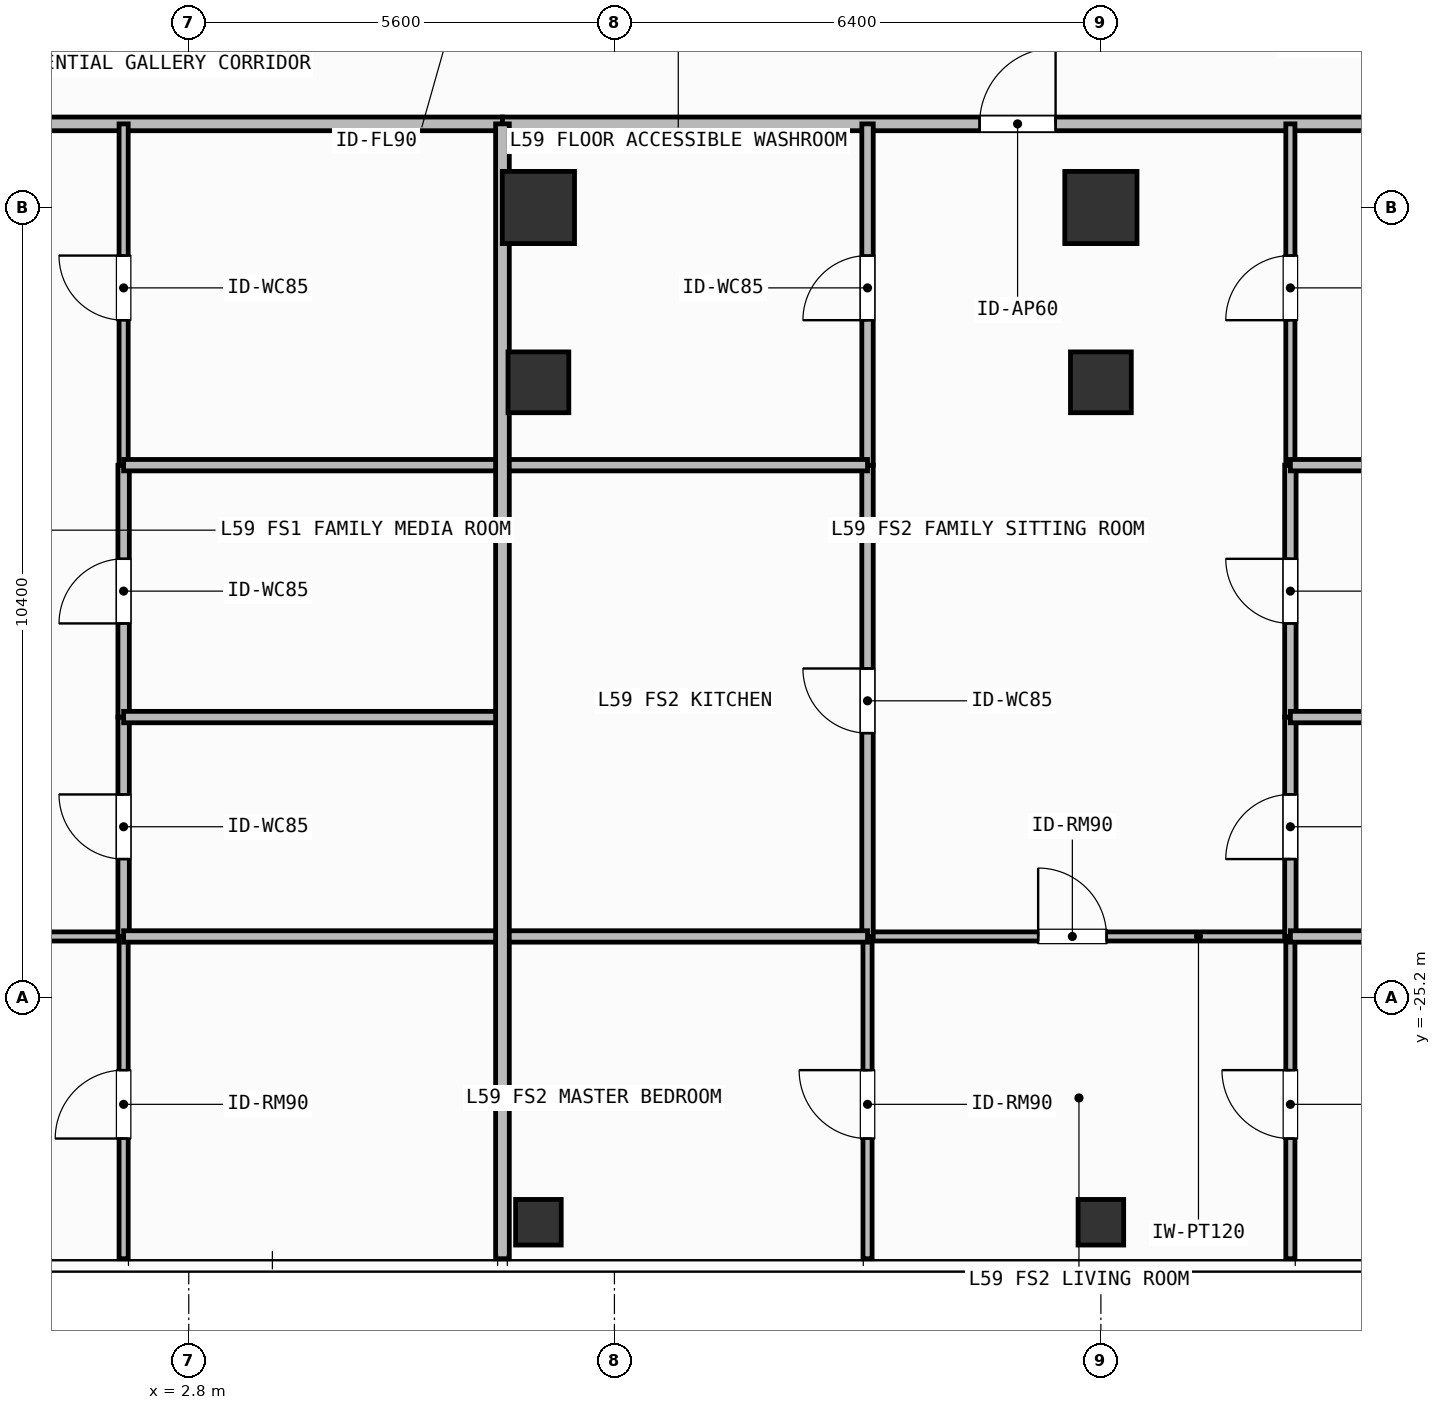
"""IFC4 building model, lengths in metres.
Left out: names, types, materials, properties, quantities, classifications, styles, units other than length and angle.
Written with IfcOpenShell. Run it as: python <this file> out.ifc"""

import sys

from ifc_helpers import new_model, si_unit, direction, frame, frame_2d, origin, origin_2d, place, context, subcontext, project, spatial, rectangle, hollow_rectangle, extrude, element, fill, save


model = new_model("IFC4")
c1 = context("Model", 3, precision=1e-05, world=origin(), true_north=direction((0.0, 1.0)))
c2 = subcontext(c1, "Body", "Model", "MODEL_VIEW")
j1 = project(units=[si_unit("LENGTHUNIT", "METRE"), si_unit("PLANEANGLEUNIT", "RADIAN")], contexts=[c1])
p1 = place(None, origin())
s1 = spatial("IfcSite", under=j1, at=p1, CompositionType="ELEMENT")
p2 = place(p1, origin())
s2 = spatial("IfcBuilding", under=s1, at=p2, CompositionType="ELEMENT")
p3 = place(p2, frame((0.0, 0.0, 243.0)))
s3 = spatial("IfcBuildingStorey", under=s2, at=p3, CompositionType="ELEMENT", Elevation=243.0)
for number, where, z_axis, x_axis in (
    (1, (7.4, -14.8, 0.0), (0.0, 0.0, 1.0), (1.0, 0.0, 0.0)),
    (2, (14.8, -14.8, 0.0), (0.0, 0.0, 1.0), (1.0, 0.0, 0.0)),
):
    element("IfcColumn", number, at=place(p3, frame(where, z_axis=z_axis, x_axis=x_axis)), inside=s3, PredefinedType="COLUMN", context=c2, shape_type="SweptSolid", body=[
        extrude(rectangle(XDim=0.95, YDim=0.95, at=origin_2d()), origin(), (0.0, 0.0, 1.0), 3.9),
    ])
for number, where, z_axis, x_axis in (
    (3, (7.4, -17.1, 0.0), (0.0, 0.0, 1.0), (1.0, 0.0, 0.0)),
    (4, (14.8, -17.1, 0.0), (0.0, 0.0, 1.0), (1.0, 0.0, 0.0)),
):
    element("IfcColumn", number, at=place(p3, frame(where, z_axis=z_axis, x_axis=x_axis)), inside=s3, PredefinedType="COLUMN", context=c2, shape_type="SweptSolid", body=[
        extrude(hollow_rectangle(XDim=0.8, YDim=0.8, WallThickness=0.036, at=origin_2d()), origin(), (0.0, 0.0, 1.0), 3.9),
    ])
for number, where, z_axis, x_axis in (
    (5, (7.4, -28.15, 0.0), (0.0, 0.0, 1.0), (1.0, 0.0, 0.0)),
    (6, (14.8, -28.15, 0.0), (0.0, 0.0, 1.0), (1.0, 0.0, 0.0)),
):
    element("IfcColumn", number, at=place(p3, frame(where, z_axis=z_axis, x_axis=x_axis)), inside=s3, PredefinedType="COLUMN", context=c2, shape_type="SweptSolid", body=[
        extrude(hollow_rectangle(XDim=0.6, YDim=0.6, WallThickness=0.028, at=origin_2d()), origin(), (0.0, 0.0, 1.0), 3.9),
    ])
p4 = place(p3, frame((-15.02, -13.7, 0.0), z_axis=(0.0, 0.0, 1.0), x_axis=(1.0, 0.0, 0.0)))
e7 = element("IfcWall", 7, at=p4, inside=s3, PredefinedType="PARTITIONING", context=c2, shape_type="SweptSolid", body=[
    extrude(rectangle(XDim=21.947, YDim=0.18, at=frame_2d((10.974, 0.0))), origin(), (0.0, 0.0, 1.0), 3.68),
])
p5 = place(p4, frame((10.205, 0.0, 0.0)))
e8 = element("IfcOpeningElement", 8, at=p5, cuts=e7, PredefinedType="OPENING", context=c2, shape_type="SweptSolid", body=[
    extrude(rectangle(XDim=1.0, YDim=2.2, at=frame_2d((0.5, 1.1))), frame((0.0, 0.1, 0.0), z_axis=(0.0, -1.0, 0.0), x_axis=(1.0, 0.0, 0.0)), (0.0, 0.0, 1.0), 0.2),
])
p6 = place(p3, frame((-3.691, -24.39, 0.0), z_axis=(0.0, 0.0, 1.0), x_axis=(1.0, 0.0, 0.0)))
e9 = element("IfcWall", 9, at=p6, inside=s3, PredefinedType="PARTITIONING", context=c2, shape_type="SweptSolid", body=[
    extrude(rectangle(XDim=5.634, YDim=0.12, at=frame_2d((2.817, 0.0))), origin(), (0.0, 0.0, 1.0), 3.68),
])
p7 = place(p6, frame((2.279, 0.0, 0.0)))
e10 = element("IfcOpeningElement", 10, at=p7, cuts=e9, PredefinedType="OPENING", context=c2, shape_type="SweptSolid", body=[
    extrude(rectangle(XDim=0.9, YDim=2.1, at=frame_2d((0.45, 1.05))), frame((0.0, 0.07, 0.0), z_axis=(0.0, -1.0, 0.0), x_axis=(1.0, 0.0, 0.0)), (0.0, 0.0, 1.0), 0.14),
])
p8 = place(p3, frame((1.943, -24.39, 0.0), z_axis=(0.0, 0.0, 1.0), x_axis=(0.0, 1.0, 0.0)))
e11 = element("IfcWall", 11, at=p8, inside=s3, PredefinedType="PARTITIONING", context=c2, shape_type="SweptSolid", body=[
    extrude(rectangle(XDim=2.886, YDim=0.15, at=frame_2d((1.443, 0.0))), origin(), (0.0, 0.0, 1.0), 3.68),
])
p9 = place(p8, frame((1.018, 0.0, 0.0)))
e12 = element("IfcOpeningElement", 12, at=p9, cuts=e11, PredefinedType="OPENING", context=c2, shape_type="SweptSolid", body=[
    extrude(rectangle(XDim=0.85, YDim=2.1, at=frame_2d((0.425, 1.05))), frame((0.0, 0.085, 0.0), z_axis=(0.0, -1.0, 0.0), x_axis=(1.0, 0.0, 0.0)), (0.0, 0.0, 1.0), 0.17),
])
p10 = place(p3, frame((1.943, -21.504, 0.0), z_axis=(0.0, 0.0, 1.0), x_axis=(0.0, 1.0, 0.0)))
e13 = element("IfcWall", 13, at=p10, inside=s3, PredefinedType="PARTITIONING", context=c2, shape_type="SweptSolid", body=[
    extrude(rectangle(XDim=3.314, YDim=0.15, at=frame_2d((1.657, 0.0))), origin(), (0.0, 0.0, 1.0), 3.68),
])
p11 = place(p10, frame((1.232, 0.0, 0.0)))
e14 = element("IfcOpeningElement", 14, at=p11, cuts=e13, PredefinedType="OPENING", context=c2, shape_type="SweptSolid", body=[
    extrude(rectangle(XDim=0.85, YDim=2.1, at=frame_2d((0.425, 1.05))), frame((0.0, 0.085, 0.0), z_axis=(0.0, -1.0, 0.0), x_axis=(1.0, 0.0, 0.0)), (0.0, 0.0, 1.0), 0.17),
])
p12 = place(p3, frame((1.943, -18.19, 0.0), z_axis=(0.0, 0.0, 1.0), x_axis=(0.0, 1.0, 0.0)))
e15 = element("IfcWall", 15, at=p12, inside=s3, PredefinedType="PARTITIONING", context=c2, shape_type="SweptSolid", body=[
    extrude(rectangle(XDim=4.49, YDim=0.12, at=frame_2d((2.245, 0.0))), origin(), (0.0, 0.0, 1.0), 3.68),
])
p13 = place(p12, frame((1.907, 0.0, 0.0)))
e16 = element("IfcOpeningElement", 16, at=p13, cuts=e15, PredefinedType="OPENING", context=c2, shape_type="SweptSolid", body=[
    extrude(rectangle(XDim=0.85, YDim=2.1, at=frame_2d((0.425, 1.05))), frame((0.0, 0.07, 0.0), z_axis=(0.0, -1.0, 0.0), x_axis=(1.0, 0.0, 0.0)), (0.0, 0.0, 1.0), 0.14),
])
p14 = place(p3, frame((1.943, -28.63, 0.0), z_axis=(0.0, 0.0, 1.0), x_axis=(0.0, 1.0, 0.0)))
e17 = element("IfcWall", 17, at=p14, inside=s3, PredefinedType="PARTITIONING", context=c2, shape_type="SweptSolid", body=[
    extrude(rectangle(XDim=4.24, YDim=0.12, at=frame_2d((2.12, 0.0))), origin(), (0.0, 0.0, 1.0), 3.68),
])
p15 = place(p14, frame((1.581, 0.0, 0.0)))
e18 = element("IfcOpeningElement", 18, at=p15, cuts=e17, PredefinedType="OPENING", context=c2, shape_type="SweptSolid", body=[
    extrude(rectangle(XDim=0.9, YDim=2.1, at=frame_2d((0.45, 1.05))), frame((0.0, 0.07, 0.0), z_axis=(0.0, -1.0, 0.0), x_axis=(1.0, 0.0, 0.0)), (0.0, 0.0, 1.0), 0.14),
])
p16 = place(p3, frame((6.927, -13.7, 0.0), z_axis=(0.0, 0.0, 1.0), x_axis=(1.0, 0.0, 0.0)))
e19 = element("IfcWall", 19, at=p16, inside=s3, PredefinedType="PARTITIONING", context=c2, shape_type="SweptSolid", body=[
    extrude(rectangle(XDim=15.893, YDim=0.18, at=frame_2d((7.947, 0.0))), origin(), (0.0, 0.0, 1.0), 3.68),
])
p17 = place(p16, frame((6.277, 0.0, 0.0)))
e20 = element("IfcOpeningElement", 20, at=p17, cuts=e19, PredefinedType="OPENING", context=c2, shape_type="SweptSolid", body=[
    extrude(rectangle(XDim=1.0, YDim=2.2, at=frame_2d((0.5, 1.1))), frame((0.0, 0.1, 0.0), z_axis=(0.0, -1.0, 0.0), x_axis=(1.0, 0.0, 0.0)), (0.0, 0.0, 1.0), 0.2),
])
p18 = place(p3, frame((11.73, -24.39, 0.0), z_axis=(0.0, 0.0, 1.0), x_axis=(1.0, 0.0, 0.0)))
e21 = element("IfcWall", 21, at=p18, inside=s3, PredefinedType="PARTITIONING", context=c2, shape_type="SweptSolid", body=[
    extrude(rectangle(XDim=5.563, YDim=0.12, at=frame_2d((2.781, 0.0))), origin(), (0.0, 0.0, 1.0), 3.68),
])
p19 = place(p18, frame((2.245, 0.0, 0.0)))
e22 = element("IfcOpeningElement", 22, at=p19, cuts=e21, PredefinedType="OPENING", context=c2, shape_type="SweptSolid", body=[
    extrude(rectangle(XDim=0.9, YDim=2.1, at=frame_2d((0.45, 1.05))), frame((0.0, 0.07, 0.0), z_axis=(0.0, -1.0, 0.0), x_axis=(1.0, 0.0, 0.0)), (0.0, 0.0, 1.0), 0.14),
])
p20 = place(p3, frame((11.73, -24.39, 0.0), z_axis=(0.0, 0.0, 1.0), x_axis=(0.0, 1.0, 0.0)))
e23 = element("IfcWall", 23, at=p20, inside=s3, PredefinedType="PARTITIONING", context=c2, shape_type="SweptSolid", body=[
    extrude(rectangle(XDim=6.2, YDim=0.15, at=frame_2d((3.1, 0.0))), origin(), (0.0, 0.0, 1.0), 3.68),
])
p21 = place(p20, frame((2.675, 0.0, 0.0)))
e24 = element("IfcOpeningElement", 24, at=p21, cuts=e23, PredefinedType="OPENING", context=c2, shape_type="SweptSolid", body=[
    extrude(rectangle(XDim=0.85, YDim=2.1, at=frame_2d((0.425, 1.05))), frame((0.0, 0.085, 0.0), z_axis=(0.0, -1.0, 0.0), x_axis=(1.0, 0.0, 0.0)), (0.0, 0.0, 1.0), 0.17),
])
p22 = place(p3, frame((11.73, -18.19, 0.0), z_axis=(0.0, 0.0, 1.0), x_axis=(0.0, 1.0, 0.0)))
e25 = element("IfcWall", 25, at=p22, inside=s3, PredefinedType="PARTITIONING", context=c2, shape_type="SweptSolid", body=[
    extrude(rectangle(XDim=4.49, YDim=0.15, at=frame_2d((2.245, 0.0))), origin(), (0.0, 0.0, 1.0), 3.68),
])
p23 = place(p22, frame((1.907, 0.0, 0.0)))
e26 = element("IfcOpeningElement", 26, at=p23, cuts=e25, PredefinedType="OPENING", context=c2, shape_type="SweptSolid", body=[
    extrude(rectangle(XDim=0.85, YDim=2.1, at=frame_2d((0.425, 1.05))), frame((0.0, 0.085, 0.0), z_axis=(0.0, -1.0, 0.0), x_axis=(1.0, 0.0, 0.0)), (0.0, 0.0, 1.0), 0.17),
])
p24 = place(p3, frame((11.73, -28.63, 0.0), z_axis=(0.0, 0.0, 1.0), x_axis=(0.0, 1.0, 0.0)))
e27 = element("IfcWall", 27, at=p24, inside=s3, PredefinedType="PARTITIONING", context=c2, shape_type="SweptSolid", body=[
    extrude(rectangle(XDim=4.24, YDim=0.12, at=frame_2d((2.12, 0.0))), origin(), (0.0, 0.0, 1.0), 3.68),
])
p25 = place(p24, frame((1.581, 0.0, 0.0)))
e28 = element("IfcOpeningElement", 28, at=p25, cuts=e27, PredefinedType="OPENING", context=c2, shape_type="SweptSolid", body=[
    extrude(rectangle(XDim=0.9, YDim=2.1, at=frame_2d((0.45, 1.05))), frame((0.0, 0.07, 0.0), z_axis=(0.0, -1.0, 0.0), x_axis=(1.0, 0.0, 0.0)), (0.0, 0.0, 1.0), 0.14),
])
p26 = place(p3, frame((17.293, -24.39, 0.0), z_axis=(0.0, 0.0, 1.0), x_axis=(0.0, 1.0, 0.0)))
e29 = element("IfcWall", 29, at=p26, inside=s3, PredefinedType="PARTITIONING", context=c2, shape_type="SweptSolid", body=[
    extrude(rectangle(XDim=2.886, YDim=0.15, at=frame_2d((1.443, 0.0))), origin(), (0.0, 0.0, 1.0), 3.68),
])
p27 = place(p26, frame((1.018, 0.0, 0.0)))
e30 = element("IfcOpeningElement", 30, at=p27, cuts=e29, PredefinedType="OPENING", context=c2, shape_type="SweptSolid", body=[
    extrude(rectangle(XDim=0.85, YDim=2.1, at=frame_2d((0.425, 1.05))), frame((0.0, 0.085, 0.0), z_axis=(0.0, -1.0, 0.0), x_axis=(1.0, 0.0, 0.0)), (0.0, 0.0, 1.0), 0.17),
])
p28 = place(p3, frame((17.293, -21.504, 0.0), z_axis=(0.0, 0.0, 1.0), x_axis=(0.0, 1.0, 0.0)))
e31 = element("IfcWall", 31, at=p28, inside=s3, PredefinedType="PARTITIONING", context=c2, shape_type="SweptSolid", body=[
    extrude(rectangle(XDim=3.314, YDim=0.15, at=frame_2d((1.657, 0.0))), origin(), (0.0, 0.0, 1.0), 3.68),
])
p29 = place(p28, frame((1.232, 0.0, 0.0)))
e32 = element("IfcOpeningElement", 32, at=p29, cuts=e31, PredefinedType="OPENING", context=c2, shape_type="SweptSolid", body=[
    extrude(rectangle(XDim=0.85, YDim=2.1, at=frame_2d((0.425, 1.05))), frame((0.0, 0.085, 0.0), z_axis=(0.0, -1.0, 0.0), x_axis=(1.0, 0.0, 0.0)), (0.0, 0.0, 1.0), 0.17),
])
p30 = place(p3, frame((17.293, -18.19, 0.0), z_axis=(0.0, 0.0, 1.0), x_axis=(0.0, 1.0, 0.0)))
e33 = element("IfcWall", 33, at=p30, inside=s3, PredefinedType="PARTITIONING", context=c2, shape_type="SweptSolid", body=[
    extrude(rectangle(XDim=4.49, YDim=0.12, at=frame_2d((2.245, 0.0))), origin(), (0.0, 0.0, 1.0), 3.68),
])
p31 = place(p30, frame((1.907, 0.0, 0.0)))
e34 = element("IfcOpeningElement", 34, at=p31, cuts=e33, PredefinedType="OPENING", context=c2, shape_type="SweptSolid", body=[
    extrude(rectangle(XDim=0.85, YDim=2.1, at=frame_2d((0.425, 1.05))), frame((0.0, 0.07, 0.0), z_axis=(0.0, -1.0, 0.0), x_axis=(1.0, 0.0, 0.0)), (0.0, 0.0, 1.0), 0.14),
])
p32 = place(p3, frame((17.293, -28.63, 0.0), z_axis=(0.0, 0.0, 1.0), x_axis=(0.0, 1.0, 0.0)))
e35 = element("IfcWall", 35, at=p32, inside=s3, PredefinedType="PARTITIONING", context=c2, shape_type="SweptSolid", body=[
    extrude(rectangle(XDim=4.24, YDim=0.12, at=frame_2d((2.12, 0.0))), origin(), (0.0, 0.0, 1.0), 3.68),
])
p33 = place(p32, frame((1.581, 0.0, 0.0)))
e36 = element("IfcOpeningElement", 36, at=p33, cuts=e35, PredefinedType="OPENING", context=c2, shape_type="SweptSolid", body=[
    extrude(rectangle(XDim=0.9, YDim=2.1, at=frame_2d((0.45, 1.05))), frame((0.0, 0.07, 0.0), z_axis=(0.0, -1.0, 0.0), x_axis=(1.0, 0.0, 0.0)), (0.0, 0.0, 1.0), 0.14),
])
for number, where, z_axis, x_axis in (
    (37, (1.943, -21.504, 0.0), (0.0, 0.0, 1.0), (1.0, 0.0, 0.0)),
    (38, (1.943, -18.19, 0.0), (0.0, 0.0, 1.0), (1.0, 0.0, 0.0)),
    (39, (1.943, -24.39, 0.0), (0.0, 0.0, 1.0), (1.0, 0.0, 0.0)),
):
    element("IfcWall", number, at=place(p3, frame(where, z_axis=z_axis, x_axis=x_axis)), inside=s3, PredefinedType="PARTITIONING", context=c2, shape_type="SweptSolid", body=[
        extrude(rectangle(XDim=4.984, YDim=0.15, at=frame_2d((2.492, 0.0))), origin(), (0.0, 0.0, 1.0), 3.68),
    ])
for number, where, z_axis, x_axis in (
    (40, (6.927, -18.19, 0.0), (0.0, 0.0, 1.0), (1.0, 0.0, 0.0)),
    (41, (6.927, -24.39, 0.0), (0.0, 0.0, 1.0), (1.0, 0.0, 0.0)),
):
    element("IfcWall", number, at=place(p3, frame(where, z_axis=z_axis, x_axis=x_axis)), inside=s3, PredefinedType="PARTITIONING", context=c2, shape_type="SweptSolid", body=[
        extrude(rectangle(XDim=4.803, YDim=0.15, at=frame_2d((2.401, 0.0))), origin(), (0.0, 0.0, 1.0), 3.68),
    ])
p34 = place(p3, frame((17.293, -21.504, 0.0), z_axis=(0.0, 0.0, 1.0), x_axis=(1.0, 0.0, 0.0)))
e42 = element("IfcWall", 42, at=p34, inside=s3, PredefinedType="PARTITIONING", context=c2, shape_type="SweptSolid", body=[
    extrude(rectangle(XDim=5.527, YDim=0.15, at=frame_2d((2.764, 0.0))), origin(), (0.0, 0.0, 1.0), 3.42),
])
for number, where, z_axis, x_axis in (
    (43, (17.293, -18.19, 0.0), (0.0, 0.0, 1.0), (1.0, 0.0, 0.0)),
    (44, (17.293, -24.39, 0.0), (0.0, 0.0, 1.0), (1.0, 0.0, 0.0)),
):
    element("IfcWall", number, at=place(p3, frame(where, z_axis=z_axis, x_axis=x_axis)), inside=s3, PredefinedType="PARTITIONING", context=c2, shape_type="SweptSolid", body=[
        extrude(rectangle(XDim=5.527, YDim=0.15, at=frame_2d((2.764, 0.0))), origin(), (0.0, 0.0, 1.0), 3.68),
    ])
p35 = place(p3, frame((6.927, -28.63, 0.0), z_axis=(0.0, 0.0, 1.0), x_axis=(0.0, 1.0, 0.0)))
e45 = element("IfcWall", 45, at=p35, inside=s3, PredefinedType="PARTITIONING", context=c2, shape_type="SweptSolid", body=[
    extrude(rectangle(XDim=14.93, YDim=0.18, at=frame_2d((7.465, 0.0))), origin(), (0.0, 0.0, 1.0), 3.68),
])
p36 = place(p9, origin())
e46 = element("IfcDoor", 46, at=p36, inside=s3, OperationType="SINGLE_SWING_RIGHT", PredefinedType="DOOR", context=c2, shape_type="SweptSolid", body=[
    extrude(rectangle(XDim=0.85, YDim=2.1, at=frame_2d((0.425, 1.05))), frame((0.0, 0.025, 0.0), z_axis=(0.0, -1.0, 0.0), x_axis=(1.0, 0.0, 0.0)), (0.0, 0.0, 1.0), 0.05),
])
fill(e12, e46)
p37 = place(p11, origin())
e47 = element("IfcDoor", 47, at=p37, inside=s3, OperationType="SINGLE_SWING_LEFT", PredefinedType="DOOR", context=c2, shape_type="SweptSolid", body=[
    extrude(rectangle(XDim=0.85, YDim=2.1, at=frame_2d((0.425, 1.05))), frame((0.0, 0.025, 0.0), z_axis=(0.0, -1.0, 0.0), x_axis=(1.0, 0.0, 0.0)), (0.0, 0.0, 1.0), 0.05),
])
fill(e14, e47)
p38 = place(p13, origin())
e48 = element("IfcDoor", 48, at=p38, inside=s3, OperationType="SINGLE_SWING_RIGHT", PredefinedType="DOOR", context=c2, shape_type="SweptSolid", body=[
    extrude(rectangle(XDim=0.85, YDim=2.1, at=frame_2d((0.425, 1.05))), frame((0.0, 0.025, 0.0), z_axis=(0.0, -1.0, 0.0), x_axis=(1.0, 0.0, 0.0)), (0.0, 0.0, 1.0), 0.05),
])
fill(e16, e48)
p39 = place(p15, origin())
e49 = element("IfcDoor", 49, at=p39, inside=s3, OperationType="SINGLE_SWING_LEFT", PredefinedType="DOOR", context=c2, shape_type="SweptSolid", body=[
    extrude(rectangle(XDim=0.9, YDim=2.1, at=frame_2d((0.45, 1.05))), frame((0.0, 0.025, 0.0), z_axis=(0.0, -1.0, 0.0), x_axis=(1.0, 0.0, 0.0)), (0.0, 0.0, 1.0), 0.05),
])
fill(e18, e49)
p40 = place(p17, origin())
e50 = element("IfcDoor", 50, at=p40, inside=s3, OperationType="SINGLE_SWING_RIGHT", PredefinedType="DOOR", context=c2, shape_type="SweptSolid", body=[
    extrude(rectangle(XDim=1.0, YDim=2.2, at=frame_2d((0.5, 1.1))), frame((0.0, 0.025, 0.0), z_axis=(0.0, -1.0, 0.0), x_axis=(1.0, 0.0, 0.0)), (0.0, 0.0, 1.0), 0.05),
])
fill(e20, e50)
p41 = place(p19, origin())
e51 = element("IfcDoor", 51, at=p41, inside=s3, OperationType="SINGLE_SWING_LEFT", PredefinedType="DOOR", context=c2, shape_type="SweptSolid", body=[
    extrude(rectangle(XDim=0.9, YDim=2.1, at=frame_2d((0.45, 1.05))), frame((0.0, 0.025, 0.0), z_axis=(0.0, -1.0, 0.0), x_axis=(1.0, 0.0, 0.0)), (0.0, 0.0, 1.0), 0.05),
])
fill(e22, e51)
p42 = place(p21, origin())
e52 = element("IfcDoor", 52, at=p42, inside=s3, OperationType="SINGLE_SWING_RIGHT", PredefinedType="DOOR", context=c2, shape_type="SweptSolid", body=[
    extrude(rectangle(XDim=0.85, YDim=2.1, at=frame_2d((0.425, 1.05))), frame((0.0, 0.025, 0.0), z_axis=(0.0, -1.0, 0.0), x_axis=(1.0, 0.0, 0.0)), (0.0, 0.0, 1.0), 0.05),
])
fill(e24, e52)
p43 = place(p23, origin())
e53 = element("IfcDoor", 53, at=p43, inside=s3, OperationType="SINGLE_SWING_LEFT", PredefinedType="DOOR", context=c2, shape_type="SweptSolid", body=[
    extrude(rectangle(XDim=0.85, YDim=2.1, at=frame_2d((0.425, 1.05))), frame((0.0, 0.025, 0.0), z_axis=(0.0, -1.0, 0.0), x_axis=(1.0, 0.0, 0.0)), (0.0, 0.0, 1.0), 0.05),
])
fill(e26, e53)
p44 = place(p25, origin())
e54 = element("IfcDoor", 54, at=p44, inside=s3, OperationType="SINGLE_SWING_RIGHT", PredefinedType="DOOR", context=c2, shape_type="SweptSolid", body=[
    extrude(rectangle(XDim=0.9, YDim=2.1, at=frame_2d((0.45, 1.05))), frame((0.0, 0.025, 0.0), z_axis=(0.0, -1.0, 0.0), x_axis=(1.0, 0.0, 0.0)), (0.0, 0.0, 1.0), 0.05),
])
fill(e28, e54)
p45 = place(p27, origin())
e55 = element("IfcDoor", 55, at=p45, inside=s3, OperationType="SINGLE_SWING_LEFT", PredefinedType="DOOR", context=c2, shape_type="SweptSolid", body=[
    extrude(rectangle(XDim=0.85, YDim=2.1, at=frame_2d((0.425, 1.05))), frame((0.0, 0.025, 0.0), z_axis=(0.0, -1.0, 0.0), x_axis=(1.0, 0.0, 0.0)), (0.0, 0.0, 1.0), 0.05),
])
fill(e30, e55)
p46 = place(p29, origin())
e56 = element("IfcDoor", 56, at=p46, inside=s3, OperationType="SINGLE_SWING_RIGHT", PredefinedType="DOOR", context=c2, shape_type="SweptSolid", body=[
    extrude(rectangle(XDim=0.85, YDim=2.1, at=frame_2d((0.425, 1.05))), frame((0.0, 0.025, 0.0), z_axis=(0.0, -1.0, 0.0), x_axis=(1.0, 0.0, 0.0)), (0.0, 0.0, 1.0), 0.05),
])
fill(e32, e56)
p47 = place(p31, origin())
e57 = element("IfcDoor", 57, at=p47, inside=s3, OperationType="SINGLE_SWING_LEFT", PredefinedType="DOOR", context=c2, shape_type="SweptSolid", body=[
    extrude(rectangle(XDim=0.85, YDim=2.1, at=frame_2d((0.425, 1.05))), frame((0.0, 0.025, 0.0), z_axis=(0.0, -1.0, 0.0), x_axis=(1.0, 0.0, 0.0)), (0.0, 0.0, 1.0), 0.05),
])
fill(e34, e57)
p48 = place(p33, origin())
e58 = element("IfcDoor", 58, at=p48, inside=s3, OperationType="SINGLE_SWING_RIGHT", PredefinedType="DOOR", context=c2, shape_type="SweptSolid", body=[
    extrude(rectangle(XDim=0.9, YDim=2.1, at=frame_2d((0.45, 1.05))), frame((0.0, 0.025, 0.0), z_axis=(0.0, -1.0, 0.0), x_axis=(1.0, 0.0, 0.0)), (0.0, 0.0, 1.0), 0.05),
])
fill(e36, e58)
save(model, sys.argv[1])
